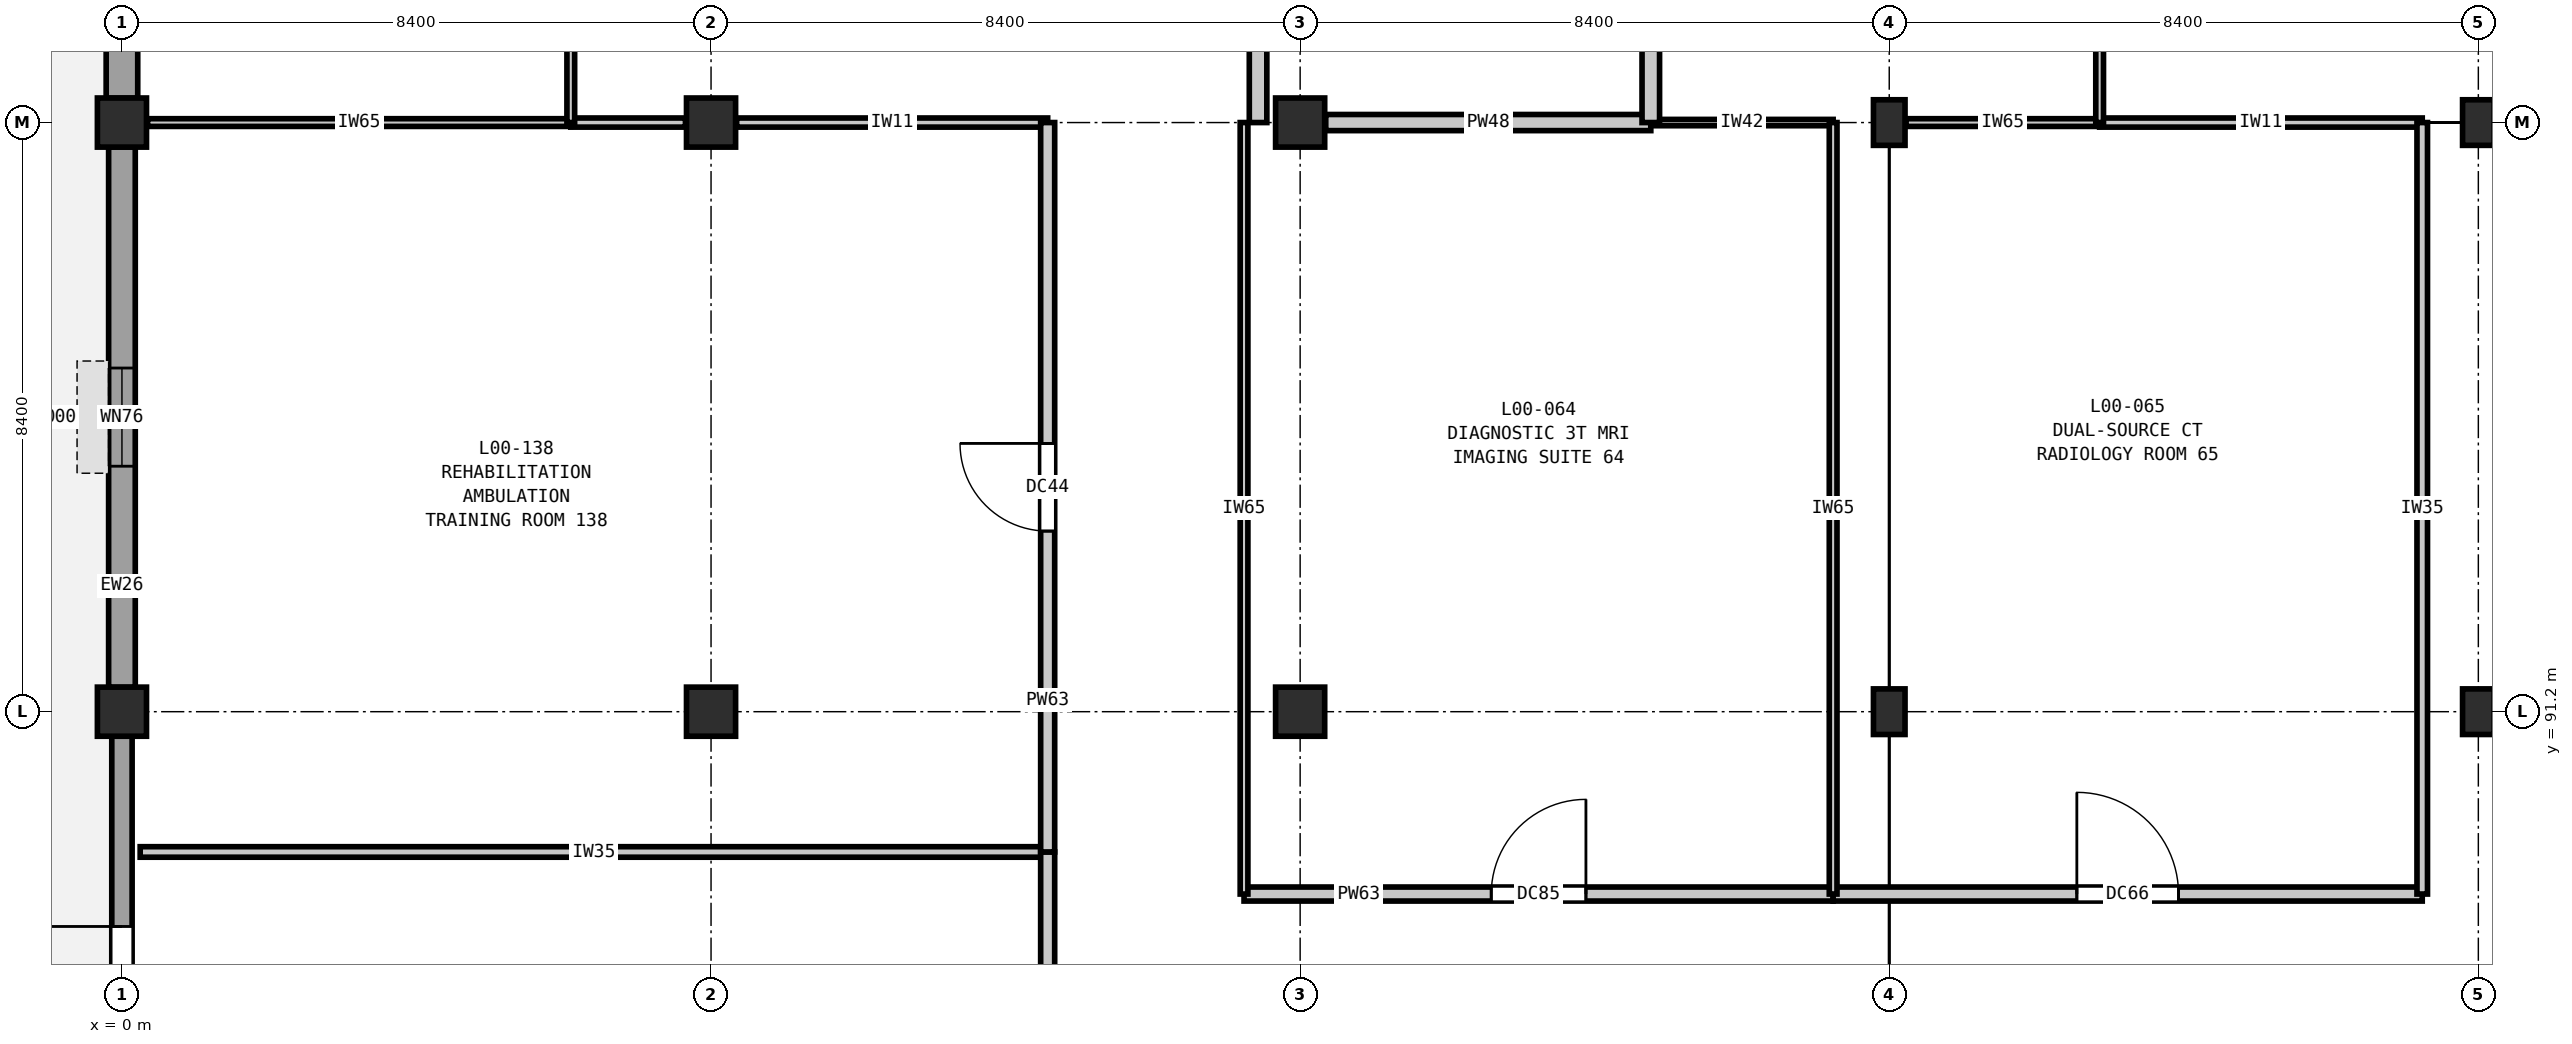
"""IFC4 building model, lengths in metres.
Left out: names, types, materials, properties, quantities, classifications, styles, units other than length and angle.
Written with IfcOpenShell. Run it as: python <this file> out.ifc"""

import sys

from ifc_helpers import new_model, si_unit, direction, frame, frame_2d, origin, origin_2d, place, context, subcontext, project, spatial, rectangle, extrude, element, fill, save


model = new_model("IFC4")
c1 = context("Model", 3, precision=1e-05, world=origin(), true_north=direction((0.0, 1.0)))
c2 = subcontext(c1, "Body", "Model", "MODEL_VIEW")
j1 = project(units=[si_unit("LENGTHUNIT", "METRE"), si_unit("PLANEANGLEUNIT", "RADIAN")], contexts=[c1])
p1 = place(None, origin())
s1 = spatial("IfcSite", under=j1, at=p1, CompositionType="ELEMENT")
p2 = place(p1, origin())
s2 = spatial("IfcBuilding", under=s1, at=p2, CompositionType="ELEMENT")
p3 = place(p2, origin())
s3 = spatial("IfcBuildingStorey", under=s2, at=p3, CompositionType="ELEMENT", Elevation=0.0)
for number, where, z_axis, x_axis in (
    (1, (0.0, 91.2, 0.0), (0.0, 0.0, 1.0), (1.0, 0.0, 0.0)),
    (2, (0.0, 99.6, 0.0), (0.0, 0.0, 1.0), (1.0, 0.0, 0.0)),
    (3, (8.4, 91.2, 0.0), (0.0, 0.0, 1.0), (1.0, 0.0, 0.0)),
    (4, (8.4, 99.6, 0.0), (0.0, 0.0, 1.0), (1.0, 0.0, 0.0)),
    (5, (16.8, 91.2, 0.0), (0.0, 0.0, 1.0), (1.0, 0.0, 0.0)),
    (6, (16.8, 99.6, 0.0), (0.0, 0.0, 1.0), (1.0, 0.0, 0.0)),
):
    element("IfcColumn", number, at=place(p3, frame(where, z_axis=z_axis, x_axis=x_axis)), inside=s3, PredefinedType="COLUMN", context=c2, shape_type="SweptSolid", body=[
        extrude(rectangle(XDim=0.7, YDim=0.7, at=origin_2d()), origin(), (0.0, 0.0, 1.0), 5.4),
    ])
for number, where, z_axis, x_axis in (
    (7, (25.2, 91.2, 0.0), (0.0, 0.0, 1.0), (1.0, 0.0, 0.0)),
    (8, (25.2, 99.6, 0.0), (0.0, 0.0, 1.0), (1.0, 0.0, 0.0)),
    (9, (33.6, 91.2, 0.0), (0.0, 0.0, 1.0), (1.0, 0.0, 0.0)),
    (10, (33.6, 99.6, 0.0), (0.0, 0.0, 1.0), (1.0, 0.0, 0.0)),
):
    element("IfcColumn", number, at=place(p3, frame(where, z_axis=z_axis, x_axis=x_axis)), inside=s3, PredefinedType="COLUMN", context=c2, shape_type="SweptSolid", body=[
        extrude(rectangle(XDim=0.45, YDim=0.65, at=origin_2d()), origin(), (0.0, 0.0, 1.0), 5.4),
    ])
p4 = place(p3, frame((0.0, 83.123, 0.0), z_axis=(0.0, 0.0, 1.0), x_axis=(0.0, 1.0, 0.0)))
e11 = element("IfcWall", 11, at=p4, inside=s3, PredefinedType="SOLIDWALL", context=c2, shape_type="SweptSolid", body=[
    extrude(rectangle(XDim=7.729, YDim=0.29, at=frame_2d((3.865, 0.0))), origin(), (0.0, 0.0, 1.0), 4.68),
])
p5 = place(p4, frame((2.715, 0.0, 0.0)))
e12 = element("IfcOpeningElement", 12, at=p5, cuts=e11, PredefinedType="OPENING", context=c2, shape_type="SweptSolid", body=[
    extrude(rectangle(XDim=2.3, YDim=2.5, at=frame_2d((1.15, 1.25))), frame((0.0, 0.155, 0.0), z_axis=(0.0, -1.0, 0.0), x_axis=(1.0, 0.0, 0.0)), (0.0, 0.0, 1.0), 0.31),
])
p6 = place(p3, frame((0.0, 91.548, 0.0), z_axis=(0.0, 0.0, 1.0), x_axis=(0.0, 1.0, 0.0)))
e13 = element("IfcWall", 13, at=p6, inside=s3, PredefinedType="SOLIDWALL", context=c2, shape_type="SweptSolid", body=[
    extrude(rectangle(XDim=7.704, YDim=0.38, at=frame_2d((3.852, 0.0))), origin(), (0.0, 0.0, 1.0), 4.68),
])
p7 = place(p6, frame((3.152, 0.0, 0.9)))
e14 = element("IfcOpeningElement", 14, at=p7, cuts=e13, PredefinedType="OPENING", context=c2, shape_type="SweptSolid", body=[
    extrude(rectangle(XDim=1.4, YDim=1.4, at=frame_2d((0.7, 0.7))), frame((0.0, 0.2, 0.0), z_axis=(0.0, -1.0, 0.0), x_axis=(1.0, 0.0, 0.0)), (0.0, 0.0, 1.0), 0.4),
])
p8 = place(p3, frame((0.0, 99.948, 0.0), z_axis=(0.0, 0.0, 1.0), x_axis=(0.0, 1.0, 0.0)))
e15 = element("IfcWall", 15, at=p8, inside=s3, PredefinedType="SOLIDWALL", context=c2, shape_type="SweptSolid", body=[
    extrude(rectangle(XDim=2.504, YDim=0.45, at=frame_2d((1.252, 0.0))), origin(), (0.0, 0.0, 1.0), 4.68),
])
p9 = place(p3, frame((16.0, 88.6, 0.0), z_axis=(0.0, 0.0, 1.0), x_axis=(1.0, 0.0, 0.0)))
e16 = element("IfcWall", 16, at=p9, inside=s3, PredefinedType="PARTITIONING", context=c2, shape_type="SweptSolid", body=[
    extrude(rectangle(XDim=8.4, YDim=0.2, at=frame_2d((4.2, 0.0))), origin(), (0.0, 0.0, 1.0), 5.04),
])
p10 = place(p9, frame((3.525, 0.0, 0.0)))
e17 = element("IfcOpeningElement", 17, at=p10, cuts=e16, PredefinedType="OPENING", context=c2, shape_type="SweptSolid", body=[
    extrude(rectangle(XDim=1.35, YDim=2.2, at=frame_2d((0.675, 1.1))), frame((0.0, 0.11, 0.0), z_axis=(0.0, -1.0, 0.0), x_axis=(1.0, 0.0, 0.0)), (0.0, 0.0, 1.0), 0.22),
])
p11 = place(p3, frame((24.4, 88.6, 0.0), z_axis=(0.0, 0.0, 1.0), x_axis=(1.0, 0.0, 0.0)))
e18 = element("IfcWall", 18, at=p11, inside=s3, PredefinedType="PARTITIONING", context=c2, shape_type="SweptSolid", body=[
    extrude(rectangle(XDim=8.4, YDim=0.2, at=frame_2d((4.2, 0.0))), origin(), (0.0, 0.0, 1.0), 5.04),
])
p12 = place(p11, frame((3.475, 0.0, 0.0)))
e19 = element("IfcOpeningElement", 19, at=p12, cuts=e18, PredefinedType="OPENING", context=c2, shape_type="SweptSolid", body=[
    extrude(rectangle(XDim=1.45, YDim=2.25, at=frame_2d((0.725, 1.125))), frame((0.0, 0.11, 0.0), z_axis=(0.0, -1.0, 0.0), x_axis=(1.0, 0.0, 0.0)), (0.0, 0.0, 1.0), 0.22),
])
p13 = place(p3, frame((0.26, 89.2, 0.0), z_axis=(0.0, 0.0, 1.0), x_axis=(1.0, 0.0, 0.0)))
e20 = element("IfcWall", 20, at=p13, inside=s3, PredefinedType="PARTITIONING", context=c2, shape_type="SweptSolid", body=[
    extrude(rectangle(XDim=12.94, YDim=0.15, at=frame_2d((6.47, 0.0))), origin(), (0.0, 0.0, 1.0), 5.04),
])
p14 = place(p3, frame((0.365, 99.6, 0.0), z_axis=(0.0, 0.0, 1.0), x_axis=(1.0, 0.0, 0.0)))
e21 = element("IfcWall", 21, at=p14, inside=s3, PredefinedType="PARTITIONING", context=c2, shape_type="SweptSolid", body=[
    extrude(rectangle(XDim=6.035, YDim=0.11, at=frame_2d((3.018, 0.0))), origin(), (0.0, 0.0, 1.0), 4.635),
])
p15 = place(p3, frame((8.765, 99.6, 0.0), z_axis=(0.0, 0.0, 1.0), x_axis=(1.0, 0.0, 0.0)))
e22 = element("IfcWall", 22, at=p15, inside=s3, PredefinedType="PARTITIONING", context=c2, shape_type="SweptSolid", body=[
    extrude(rectangle(XDim=4.435, YDim=0.13, at=frame_2d((2.218, 0.0))), origin(), (0.0, 0.0, 1.0), 4.635),
])
p16 = place(p3, frame((6.4, 99.6, 0.0), z_axis=(0.0, 0.0, 1.0), x_axis=(1.0, 0.0, 0.0)))
e23 = element("IfcWall", 23, at=p16, inside=s3, PredefinedType="PARTITIONING", context=c2, shape_type="SweptSolid", body=[
    extrude(rectangle(XDim=1.635, YDim=0.13, at=frame_2d((0.817, 0.0))), origin(), (0.0, 0.0, 1.0), 4.635),
])
p17 = place(p3, frame((17.165, 99.6, 0.0), z_axis=(0.0, 0.0, 1.0), x_axis=(1.0, 0.0, 0.0)))
e24 = element("IfcWall", 24, at=p17, inside=s3, PredefinedType="PARTITIONING", context=c2, shape_type="SweptSolid", body=[
    extrude(rectangle(XDim=4.635, YDim=0.23, at=frame_2d((2.317, 0.0))), origin(), (0.0, 0.0, 1.0), 4.635),
])
p18 = place(p3, frame((21.8, 99.6, 0.0), z_axis=(0.0, 0.0, 1.0), x_axis=(1.0, 0.0, 0.0)))
e25 = element("IfcWall", 25, at=p18, inside=s3, PredefinedType="PARTITIONING", context=c2, shape_type="SweptSolid", body=[
    extrude(rectangle(XDim=2.6, YDim=0.09, at=frame_2d((1.3, 0.0))), origin(), (0.0, 0.0, 1.0), 4.635),
])
p19 = place(p3, frame((25.44, 99.6, 0.0), z_axis=(0.0, 0.0, 1.0), x_axis=(1.0, 0.0, 0.0)))
e26 = element("IfcWall", 26, at=p19, inside=s3, PredefinedType="PARTITIONING", context=c2, shape_type="SweptSolid", body=[
    extrude(rectangle(XDim=2.76, YDim=0.11, at=frame_2d((1.38, 0.0))), origin(), (0.0, 0.0, 1.0), 4.635),
])
p20 = place(p3, frame((28.2, 99.6, 0.0), z_axis=(0.0, 0.0, 1.0), x_axis=(1.0, 0.0, 0.0)))
e27 = element("IfcWall", 27, at=p20, inside=s3, PredefinedType="PARTITIONING", context=c2, shape_type="SweptSolid", body=[
    extrude(rectangle(XDim=4.6, YDim=0.13, at=frame_2d((2.3, 0.0))), origin(), (0.0, 0.0, 1.0), 4.635),
])
p21 = place(p3, frame((6.4, 99.6, 0.0), z_axis=(0.0, 0.0, 1.0), x_axis=(0.0, 1.0, 0.0)))
e28 = element("IfcWall", 28, at=p21, inside=s3, PredefinedType="PARTITIONING", context=c2, shape_type="SweptSolid", body=[
    extrude(rectangle(XDim=13.6, YDim=0.11, at=frame_2d((6.8, 0.0))), origin(), (0.0, 0.0, 1.0), 5.04),
])
p22 = place(p3, frame((13.2, 82.8, 0.0), z_axis=(0.0, 0.0, 1.0), x_axis=(0.0, 1.0, 0.0)))
e29 = element("IfcWall", 29, at=p22, inside=s3, PredefinedType="PARTITIONING", context=c2, shape_type="SweptSolid", body=[
    extrude(rectangle(XDim=6.4, YDim=0.2, at=frame_2d((3.2, 0.0))), origin(), (0.0, 0.0, 1.0), 5.04),
])
p23 = place(p22, frame((2.275, 0.0, 0.0)))
e30 = element("IfcOpeningElement", 30, at=p23, cuts=e29, PredefinedType="OPENING", context=c2, shape_type="SweptSolid", body=[
    extrude(rectangle(XDim=1.85, YDim=2.3, at=frame_2d((0.925, 1.15))), frame((0.0, 0.11, 0.0), z_axis=(0.0, -1.0, 0.0), x_axis=(1.0, 0.0, 0.0)), (0.0, 0.0, 1.0), 0.22),
])
p24 = place(p3, frame((13.2, 89.2, 0.0), z_axis=(0.0, 0.0, 1.0), x_axis=(0.0, 1.0, 0.0)))
e31 = element("IfcWall", 31, at=p24, inside=s3, PredefinedType="PARTITIONING", context=c2, shape_type="SweptSolid", body=[
    extrude(rectangle(XDim=10.4, YDim=0.2, at=frame_2d((5.2, 0.0))), origin(), (0.0, 0.0, 1.0), 5.04),
])
p25 = place(p24, frame((4.575, 0.0, 0.0)))
e32 = element("IfcOpeningElement", 32, at=p25, cuts=e31, PredefinedType="OPENING", context=c2, shape_type="SweptSolid", body=[
    extrude(rectangle(XDim=1.25, YDim=2.15, at=frame_2d((0.625, 1.075))), frame((0.0, 0.11, 0.0), z_axis=(0.0, -1.0, 0.0), x_axis=(1.0, 0.0, 0.0)), (0.0, 0.0, 1.0), 0.22),
])
p26 = place(p3, frame((16.0, 88.6, 0.0), z_axis=(0.0, 0.0, 1.0), x_axis=(0.0, 1.0, 0.0)))
e33 = element("IfcWall", 33, at=p26, inside=s3, PredefinedType="PARTITIONING", context=c2, shape_type="SweptSolid", body=[
    extrude(rectangle(XDim=11.0, YDim=0.11, at=frame_2d((5.5, 0.0))), origin(), (0.0, 0.0, 1.0), 5.04),
])
for number, where, z_axis, x_axis in (
    (34, (16.2, 99.6, 0.0), (0.0, 0.0, 1.0), (0.0, 1.0, 0.0)),
    (35, (21.8, 99.6, 0.0), (0.0, 0.0, 1.0), (0.0, 1.0, 0.0)),
):
    element("IfcWall", number, at=place(p3, frame(where, z_axis=z_axis, x_axis=x_axis)), inside=s3, PredefinedType="PARTITIONING", context=c2, shape_type="SweptSolid", body=[
        extrude(rectangle(XDim=13.6, YDim=0.25, at=frame_2d((6.8, 0.0))), origin(), (0.0, 0.0, 1.0), 5.04),
    ])
p27 = place(p3, frame((24.4, 88.6, 0.0), z_axis=(0.0, 0.0, 1.0), x_axis=(0.0, 1.0, 0.0)))
e36 = element("IfcWall", 36, at=p27, inside=s3, PredefinedType="PARTITIONING", context=c2, shape_type="SweptSolid", body=[
    extrude(rectangle(XDim=11.0, YDim=0.11, at=frame_2d((5.5, 0.0))), origin(), (0.0, 0.0, 1.0), 5.04),
])
p28 = place(p3, frame((28.2, 99.6, 0.0), z_axis=(0.0, 0.0, 1.0), x_axis=(0.0, 1.0, 0.0)))
e37 = element("IfcWall", 37, at=p28, inside=s3, PredefinedType="PARTITIONING", context=c2, shape_type="SweptSolid", body=[
    extrude(rectangle(XDim=13.6, YDim=0.11, at=frame_2d((6.8, 0.0))), origin(), (0.0, 0.0, 1.0), 5.04),
])
p29 = place(p3, frame((32.8, 88.6, 0.0), z_axis=(0.0, 0.0, 1.0), x_axis=(0.0, 1.0, 0.0)))
e38 = element("IfcWall", 38, at=p29, inside=s3, PredefinedType="PARTITIONING", context=c2, shape_type="SweptSolid", body=[
    extrude(rectangle(XDim=11.0, YDim=0.15, at=frame_2d((5.5, 0.0))), origin(), (0.0, 0.0, 1.0), 5.04),
])
p30 = place(p5, origin())
e39 = element("IfcDoor", 39, at=p30, inside=s3, OperationType="DOUBLE_DOOR_SINGLE_SWING", PredefinedType="DOOR", context=c2, shape_type="SweptSolid", body=[
    extrude(rectangle(XDim=2.3, YDim=2.5, at=frame_2d((1.15, 1.25))), frame((0.0, 0.025, 0.0), z_axis=(0.0, -1.0, 0.0), x_axis=(1.0, 0.0, 0.0)), (0.0, 0.0, 1.0), 0.05),
])
fill(e12, e39)
p31 = place(p7, origin())
e40 = element("IfcWindow", 40, at=p31, inside=s3, PartitioningType="SINGLE_PANEL", PredefinedType="WINDOW", context=c2, shape_type="SweptSolid", body=[
    extrude(rectangle(XDim=1.4, YDim=1.4, at=frame_2d((0.7, 0.7))), frame((0.0, 0.03, 0.0), z_axis=(0.0, -1.0, 0.0), x_axis=(1.0, 0.0, 0.0)), (0.0, 0.0, 1.0), 0.06),
])
fill(e14, e40)
p32 = place(p10, origin())
e41 = element("IfcDoor", 41, at=p32, inside=s3, OperationType="SINGLE_SWING_RIGHT", PredefinedType="DOOR", context=c2, shape_type="SweptSolid", body=[
    extrude(rectangle(XDim=1.35, YDim=2.2, at=frame_2d((0.675, 1.1))), frame((0.0, 0.025, 0.0), z_axis=(0.0, -1.0, 0.0), x_axis=(1.0, 0.0, 0.0)), (0.0, 0.0, 1.0), 0.05),
])
fill(e17, e41)
p33 = place(p12, origin())
e42 = element("IfcDoor", 42, at=p33, inside=s3, OperationType="SINGLE_SWING_LEFT", PredefinedType="DOOR", context=c2, shape_type="SweptSolid", body=[
    extrude(rectangle(XDim=1.45, YDim=2.25, at=frame_2d((0.725, 1.125))), frame((0.0, 0.025, 0.0), z_axis=(0.0, -1.0, 0.0), x_axis=(1.0, 0.0, 0.0)), (0.0, 0.0, 1.0), 0.05),
])
fill(e19, e42)
p34 = place(p25, origin())
e43 = element("IfcDoor", 43, at=p34, inside=s3, OperationType="SINGLE_SWING_RIGHT", PredefinedType="DOOR", context=c2, shape_type="SweptSolid", body=[
    extrude(rectangle(XDim=1.25, YDim=2.15, at=frame_2d((0.625, 1.075))), frame((0.0, 0.025, 0.0), z_axis=(0.0, -1.0, 0.0), x_axis=(1.0, 0.0, 0.0)), (0.0, 0.0, 1.0), 0.05),
])
fill(e32, e43)
save(model, sys.argv[1])
